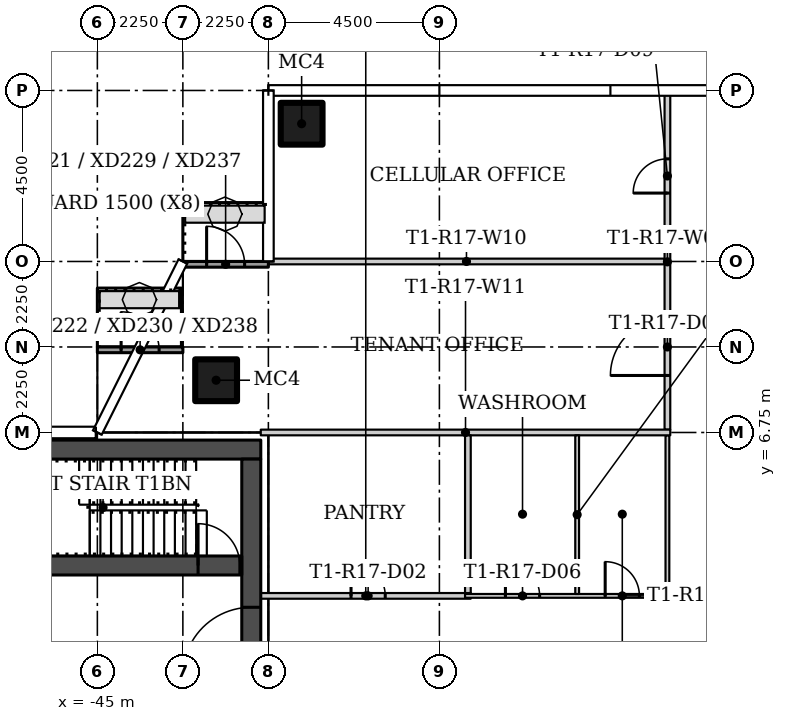
"""IFC4 building model, lengths in metres.
Left out: names, types, materials, properties, quantities, classifications, styles, units other than length and angle.
Written with IfcOpenShell. Run it as: python <this file> out.ifc"""

import sys

from ifc_helpers import new_model, si_unit, direction, frame, frame_2d, origin, origin_2d, place, context, subcontext, project, spatial, rectangle, hollow_rectangle, extrude, element, fill, save


model = new_model("IFC4")
c1 = context("Model", 3, precision=1e-05, world=origin(), true_north=direction((0.0, 1.0)))
c2 = subcontext(c1, "Body", "Model", "MODEL_VIEW")
j1 = project(units=[si_unit("LENGTHUNIT", "METRE"), si_unit("PLANEANGLEUNIT", "RADIAN")], contexts=[c1])
p1 = place(None, origin())
s1 = spatial("IfcSite", under=j1, at=p1, CompositionType="ELEMENT")
p2 = place(p1, origin())
s2 = spatial("IfcBuilding", under=s1, at=p2, CompositionType="ELEMENT")
p3 = place(p2, frame((0.0, 0.0, 150.6)))
s3 = spatial("IfcBuildingStorey", under=s2, at=p3, CompositionType="ELEMENT", Elevation=150.6)
for number, where in (
    (1, (-41.875, 8.125, 0.0)),
    (2, (-39.625, 14.875, 0.0)),
):
    element("IfcColumn", number, at=place(p3, frame(where)), inside=s3, PredefinedType="COLUMN", context=c2, shape_type="SweptSolid", body=[
        extrude(hollow_rectangle(XDim=1.1, YDim=1.1, WallThickness=0.04, at=origin_2d()), origin(), (0.0, 0.0, 1.0), 3.55),
    ])
p4 = place(p3, frame((-30.0, 6.825, 0.0), z_axis=(0.0, 0.0, 1.0), x_axis=(0.0, 1.0, 0.0)))
e3 = element("IfcWall", 3, at=p4, inside=s3, PredefinedType="PARTITIONING", context=c2, shape_type="SweptSolid", body=[
    extrude(rectangle(XDim=8.83, YDim=0.15, at=frame_2d((4.415, 0.0))), origin(), (0.0, 0.0, 1.0), 3.55),
])
p5 = place(p4, frame((1.425, 0.0, 0.0)))
e4 = element("IfcOpeningElement", 4, at=p5, cuts=e3, PredefinedType="OPENING", context=c2, shape_type="SweptSolid", body=[
    extrude(rectangle(XDim=1.5, YDim=2.1, at=frame_2d((0.75, 1.05))), frame((0.0, 0.085, 0.0), z_axis=(0.0, -1.0, 0.0), x_axis=(1.0, 0.0, 0.0)), (0.0, 0.0, 1.0), 0.17),
])
p6 = place(p4, frame((6.225, 0.0, 0.0)))
e5 = element("IfcOpeningElement", 5, at=p6, cuts=e3, PredefinedType="OPENING", context=c2, shape_type="SweptSolid", body=[
    extrude(rectangle(XDim=0.9, YDim=2.1, at=frame_2d((0.45, 1.05))), frame((0.0, 0.085, 0.0), z_axis=(0.0, -1.0, 0.0), x_axis=(1.0, 0.0, 0.0)), (0.0, 0.0, 1.0), 0.17),
])
p7 = place(p3, frame((-40.7, 2.45, 0.0)))
e6 = element("IfcWall", 6, at=p7, inside=s3, PredefinedType="PARTITIONING", context=c2, shape_type="SweptSolid", body=[
    extrude(rectangle(XDim=5.525, YDim=0.15, at=frame_2d((2.762, 0.0))), origin(), (0.0, 0.0, 1.0), 3.55),
])
p8 = place(p7, frame((2.375, 0.0, 0.0)))
e7 = element("IfcOpeningElement", 7, at=p8, cuts=e6, PredefinedType="OPENING", context=c2, shape_type="SweptSolid", body=[
    extrude(rectangle(XDim=0.9, YDim=2.1, at=frame_2d((0.45, 1.05))), frame((0.0, 0.085, 0.0), z_axis=(0.0, -1.0, 0.0), x_axis=(1.0, 0.0, 0.0)), (0.0, 0.0, 1.0), 0.17),
])
p9 = place(p3, frame((-35.325, 2.45, 0.0)))
e8 = element("IfcWall", 8, at=p9, inside=s3, PredefinedType="PARTITIONING", context=c2, shape_type="SweptSolid", body=[
    extrude(rectangle(XDim=5.375, YDim=0.1, at=frame_2d((2.688, 0.0))), origin(), (0.0, 0.0, 1.0), 3.55),
])
p10 = place(p9, frame((1.062, 0.0, 0.0)))
e9 = element("IfcOpeningElement", 9, at=p10, cuts=e8, PredefinedType="OPENING", context=c2, shape_type="SweptSolid", body=[
    extrude(rectangle(XDim=0.9, YDim=2.1, at=frame_2d((0.45, 1.05))), frame((0.0, 0.06, 0.0), z_axis=(0.0, -1.0, 0.0), x_axis=(1.0, 0.0, 0.0)), (0.0, 0.0, 1.0), 0.12),
])
p11 = place(p9, frame((3.688, 0.0, 0.0)))
e10 = element("IfcOpeningElement", 10, at=p11, cuts=e8, PredefinedType="OPENING", context=c2, shape_type="SweptSolid", body=[
    extrude(rectangle(XDim=0.9, YDim=2.1, at=frame_2d((0.45, 1.05))), frame((0.0, 0.06, 0.0), z_axis=(0.0, -1.0, 0.0), x_axis=(1.0, 0.0, 0.0)), (0.0, 0.0, 1.0), 0.12),
])
p12 = place(p3, frame((-30.0, 2.5, 0.0), z_axis=(0.0, 0.0, 1.0), x_axis=(0.0, 1.0, 0.0)))
e11 = element("IfcWall", 11, at=p12, inside=s3, PredefinedType="PARTITIONING", context=c2, shape_type="SweptSolid", body=[
    extrude(rectangle(XDim=4.175, YDim=0.1, at=frame_2d((2.087, 0.0))), origin(), (0.0, 0.0, 1.0), 3.55),
])
p13 = place(p3, frame((-30.075, 11.25, 0.0), z_axis=(0.0, 0.0, 1.0), x_axis=(-1.0, 0.0, 0.0)))
e12 = element("IfcWall", 12, at=p13, inside=s3, PredefinedType="PARTITIONING", context=c2, shape_type="SweptSolid", body=[
    extrude(rectangle(XDim=10.425, YDim=0.15, at=frame_2d((5.212, 0.0))), origin(), (0.0, 0.0, 1.0), 3.55),
])
p14 = place(p3, frame((-40.7, 6.75, 0.0)))
e13 = element("IfcWall", 13, at=p14, inside=s3, PredefinedType="PARTITIONING", context=c2, shape_type="SweptSolid", body=[
    extrude(rectangle(XDim=10.775, YDim=0.15, at=frame_2d((5.387, 0.0))), origin(), (0.0, 0.0, 1.0), 3.55),
])
p15 = place(p3, frame((-35.25, 2.525, 0.0), z_axis=(0.0, 0.0, 1.0), x_axis=(0.0, 1.0, 0.0)))
e14 = element("IfcWall", 14, at=p15, inside=s3, PredefinedType="PARTITIONING", context=c2, shape_type="SweptSolid", body=[
    extrude(rectangle(XDim=4.15, YDim=0.15, at=frame_2d((2.075, 0.0))), origin(), (0.0, 0.0, 1.0), 3.55),
])
p16 = place(p3, frame((-32.375, 2.5, 0.0), z_axis=(0.0, 0.0, 1.0), x_axis=(0.0, 1.0, 0.0)))
e15 = element("IfcWall", 15, at=p16, inside=s3, PredefinedType="PARTITIONING", context=c2, shape_type="SweptSolid", body=[
    extrude(rectangle(XDim=4.175, YDim=0.1, at=frame_2d((2.087, 0.0))), origin(), (0.0, 0.0, 1.0), 3.55),
])
p17 = place(p3, frame((-42.75, 11.175, 0.0)))
e16 = element("IfcWall", 16, at=p17, inside=s3, PredefinedType="SOLIDWALL", context=c2, shape_type="SweptSolid", body=[
    extrude(rectangle(XDim=2.25, YDim=0.15, at=frame_2d((1.125, 0.0))), origin(), (0.0, 0.0, 1.0), 3.45),
])
p18 = place(p17, frame((0.625, 0.0, 0.0)))
e17 = element("IfcOpeningElement", 17, at=p18, cuts=e16, PredefinedType="OPENING", context=c2, shape_type="SweptSolid", body=[
    extrude(rectangle(XDim=1.0, YDim=2.4, at=frame_2d((0.5, 1.2))), frame((0.0, 0.085, 0.0), z_axis=(0.0, -1.0, 0.0), x_axis=(1.0, 0.0, 0.0)), (0.0, 0.0, 1.0), 0.17),
])
p19 = place(p3, frame((-45.0, 8.925, 0.0)))
e18 = element("IfcWall", 18, at=p19, inside=s3, PredefinedType="SOLIDWALL", context=c2, shape_type="SweptSolid", body=[
    extrude(rectangle(XDim=2.25, YDim=0.15, at=frame_2d((1.125, 0.0))), origin(), (0.0, 0.0, 1.0), 3.45),
])
p20 = place(p19, frame((0.625, 0.0, 0.0)))
e19 = element("IfcOpeningElement", 19, at=p20, cuts=e18, PredefinedType="OPENING", context=c2, shape_type="SweptSolid", body=[
    extrude(rectangle(XDim=1.0, YDim=2.4, at=frame_2d((0.5, 1.2))), frame((0.0, 0.085, 0.0), z_axis=(0.0, -1.0, 0.0), x_axis=(1.0, 0.0, 0.0)), (0.0, 0.0, 1.0), 0.17),
])
p21 = place(p3, frame((-40.7, 6.3, 0.0), z_axis=(0.0, 0.0, 1.0), x_axis=(-1.0, 0.0, 0.0)))
e20 = element("IfcWall", 20, at=p21, inside=s3, PredefinedType="SHEAR", context=c2, shape_type="SweptSolid", body=[
    extrude(rectangle(XDim=13.1, YDim=0.5, at=frame_2d((6.55, 0.0))), origin(), (0.0, 0.0, 1.0), 3.55),
])
p22 = place(p3, frame((-40.95, -6.05, 0.0), z_axis=(0.0, 0.0, 1.0), x_axis=(0.0, 1.0, 0.0)))
e21 = element("IfcWall", 21, at=p22, inside=s3, PredefinedType="SHEAR", context=c2, shape_type="SweptSolid", body=[
    extrude(rectangle(XDim=12.1, YDim=0.5, at=frame_2d((6.05, 0.0))), origin(), (0.0, 0.0, 1.0), 3.55),
])
p23 = place(p22, frame((6.4, 0.0, 0.0)))
e22 = element("IfcOpeningElement", 22, at=p23, cuts=e21, PredefinedType="OPENING", context=c2, shape_type="SweptSolid", body=[
    extrude(rectangle(XDim=1.8, YDim=2.4, at=frame_2d((0.9, 1.2))), frame((0.0, 0.26, 0.0), z_axis=(0.0, -1.0, 0.0), x_axis=(1.0, 0.0, 0.0)), (0.0, 0.0, 1.0), 0.52),
])
p24 = place(p3, frame((-48.5, 3.25, 0.0)))
e23 = element("IfcWall", 23, at=p24, inside=s3, PredefinedType="SHEAR", context=c2, shape_type="SweptSolid", body=[
    extrude(rectangle(XDim=7.3, YDim=0.5, at=frame_2d((3.65, 0.0))), origin(), (0.0, 0.0, 1.0), 3.55),
])
p25 = place(p24, frame((6.15, 0.0, 0.0)))
e24 = element("IfcOpeningElement", 24, at=p25, cuts=e23, PredefinedType="OPENING", context=c2, shape_type="SweptSolid", body=[
    extrude(rectangle(XDim=1.1, YDim=2.1, at=frame_2d((0.55, 1.05))), frame((0.0, 0.26, 0.0), z_axis=(0.0, -1.0, 0.0), x_axis=(1.0, 0.0, 0.0)), (0.0, 0.0, 1.0), 0.52),
])
p26 = place(p8, origin())
e25 = element("IfcDoor", 25, at=p26, inside=s3, OperationType="SINGLE_SWING_RIGHT", PredefinedType="DOOR", context=c2, shape_type="SweptSolid", body=[
    extrude(rectangle(XDim=0.9, YDim=2.1, at=frame_2d((0.45, 1.05))), frame((0.0, 0.025, 0.0), z_axis=(0.0, -1.0, 0.0), x_axis=(1.0, 0.0, 0.0)), (0.0, 0.0, 1.0), 0.05),
])
fill(e7, e25)
p27 = place(p10, origin())
e26 = element("IfcDoor", 26, at=p27, inside=s3, OperationType="SINGLE_SWING_LEFT", PredefinedType="DOOR", context=c2, shape_type="SweptSolid", body=[
    extrude(rectangle(XDim=0.9, YDim=2.1, at=frame_2d((0.45, 1.05))), frame((0.0, 0.025, 0.0), z_axis=(0.0, -1.0, 0.0), x_axis=(1.0, 0.0, 0.0)), (0.0, 0.0, 1.0), 0.05),
])
fill(e9, e26)
p28 = place(p11, origin())
e27 = element("IfcDoor", 27, at=p28, inside=s3, OperationType="SINGLE_SWING_LEFT", PredefinedType="DOOR", context=c2, shape_type="SweptSolid", body=[
    extrude(rectangle(XDim=0.9, YDim=2.1, at=frame_2d((0.45, 1.05))), frame((0.0, 0.025, 0.0), z_axis=(0.0, -1.0, 0.0), x_axis=(1.0, 0.0, 0.0)), (0.0, 0.0, 1.0), 0.05),
])
fill(e10, e27)
p29 = place(p5, origin())
e28 = element("IfcDoor", 28, at=p29, inside=s3, OperationType="DOUBLE_DOOR_SINGLE_SWING", PredefinedType="DOOR", context=c2, shape_type="SweptSolid", body=[
    extrude(rectangle(XDim=1.5, YDim=2.1, at=frame_2d((0.75, 1.05))), frame((0.0, 0.025, 0.0), z_axis=(0.0, -1.0, 0.0), x_axis=(1.0, 0.0, 0.0)), (0.0, 0.0, 1.0), 0.05),
])
fill(e4, e28)
p30 = place(p6, origin())
e29 = element("IfcDoor", 29, at=p30, inside=s3, OperationType="SINGLE_SWING_RIGHT", PredefinedType="DOOR", context=c2, shape_type="SweptSolid", body=[
    extrude(rectangle(XDim=0.9, YDim=2.1, at=frame_2d((0.45, 1.05))), frame((0.0, 0.025, 0.0), z_axis=(0.0, -1.0, 0.0), x_axis=(1.0, 0.0, 0.0)), (0.0, 0.0, 1.0), 0.05),
])
fill(e5, e29)
p31 = place(p18, origin())
e30 = element("IfcDoor", 30, at=p31, inside=s3, OperationType="SINGLE_SWING_LEFT", PredefinedType="DOOR", context=c2, shape_type="SweptSolid", body=[
    extrude(rectangle(XDim=1.0, YDim=2.4, at=frame_2d((0.5, 1.2))), frame((0.0, 0.025, 0.0), z_axis=(0.0, -1.0, 0.0), x_axis=(1.0, 0.0, 0.0)), (0.0, 0.0, 1.0), 0.05),
])
fill(e17, e30)
p32 = place(p20, origin())
e31 = element("IfcDoor", 31, at=p32, inside=s3, OperationType="SINGLE_SWING_RIGHT", PredefinedType="DOOR", context=c2, shape_type="SweptSolid", body=[
    extrude(rectangle(XDim=1.0, YDim=2.4, at=frame_2d((0.5, 1.2))), frame((0.0, 0.025, 0.0), z_axis=(0.0, -1.0, 0.0), x_axis=(1.0, 0.0, 0.0)), (0.0, 0.0, 1.0), 0.05),
])
fill(e19, e31)
p33 = place(p23, origin())
e32 = element("IfcDoor", 32, at=p33, inside=s3, OperationType="DOUBLE_DOOR_SINGLE_SWING", PredefinedType="DOOR", context=c2, shape_type="SweptSolid", body=[
    extrude(rectangle(XDim=1.8, YDim=2.4, at=frame_2d((0.9, 1.2))), frame((0.0, 0.025, 0.0), z_axis=(0.0, -1.0, 0.0), x_axis=(1.0, 0.0, 0.0)), (0.0, 0.0, 1.0), 0.05),
])
fill(e22, e32)
p34 = place(p25, origin())
e33 = element("IfcDoor", 33, at=p34, inside=s3, OperationType="SINGLE_SWING_RIGHT", PredefinedType="DOOR", context=c2, shape_type="SweptSolid", body=[
    extrude(rectangle(XDim=1.1, YDim=2.1, at=frame_2d((0.55, 1.05))), frame((0.0, 0.025, 0.0), z_axis=(0.0, -1.0, 0.0), x_axis=(1.0, 0.0, 0.0)), (0.0, 0.0, 1.0), 0.05),
])
fill(e24, e33)
save(model, sys.argv[1])
